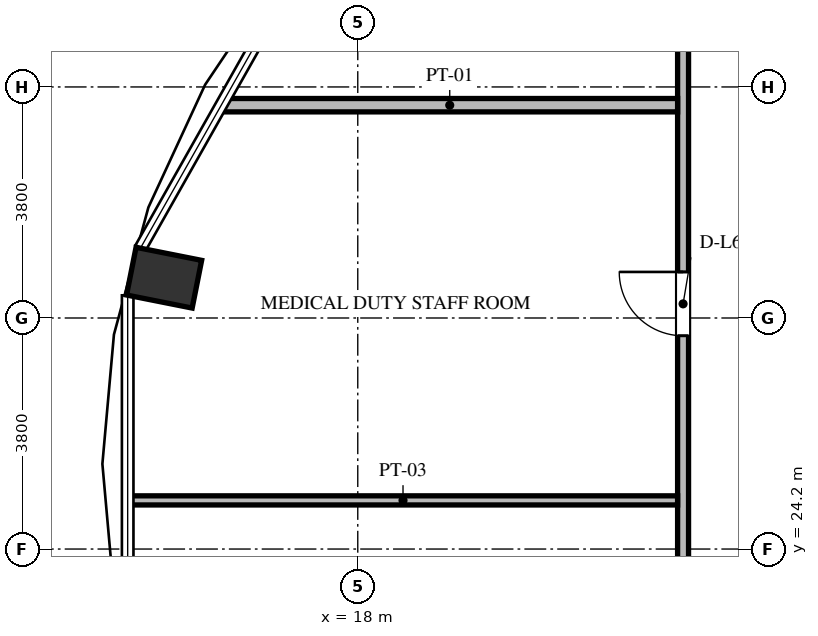
"""IFC4 building model, lengths in metres.
Left out: names, types, materials, properties, quantities, classifications, styles, units other than length and angle.
Written with IfcOpenShell. Run it as: python <this file> out.ifc"""

import sys

from ifc_helpers import new_model, si_unit, direction, frame, frame_2d, origin, origin_2d, place, context, subcontext, project, spatial, rectangle, extrude, element, fill, save


model = new_model("IFC4")
c1 = context("Model", 3, precision=1e-05, world=origin(), true_north=direction((0.0, 1.0)))
c2 = subcontext(c1, "Body", "Model", "MODEL_VIEW")
j1 = project(units=[si_unit("LENGTHUNIT", "METRE"), si_unit("PLANEANGLEUNIT", "RADIAN")], contexts=[c1])
p1 = place(None, origin())
s1 = spatial("IfcSite", under=j1, at=p1, CompositionType="ELEMENT")
p2 = place(p1, origin())
s2 = spatial("IfcBuilding", under=s1, at=p2, CompositionType="ELEMENT")
p3 = place(p2, frame((0.0, 0.0, 265.968)))
s3 = spatial("IfcBuildingStorey", under=s2, at=p3, CompositionType="ELEMENT", Elevation=265.968)
p4 = place(p3, frame((14.815, 28.663, 0.0), z_axis=(0.0, 0.0, 1.0), x_axis=(-0.980785280403, 0.195090322016, 0.0)))
e1 = element("IfcColumn", 1, at=p4, inside=s3, PredefinedType="COLUMN", context=c2, shape_type="SweptSolid", body=[
    extrude(rectangle(XDim=1.1, YDim=0.8, at=origin_2d()), origin(), (0.0, 0.0, 1.0), 3.648),
])
p5 = place(p3, frame((23.35, 19.98, 0.0), z_axis=(0.0, 0.0, 1.0), x_axis=(0.0, 1.0, 0.0)))
e2 = element("IfcWall", 2, at=p5, inside=s3, PredefinedType="PARTITIONING", context=c2, shape_type="SweptSolid", body=[
    extrude(rectangle(XDim=16.042, YDim=0.18, at=frame_2d((8.021, 0.0))), origin(), (0.0, 0.0, 1.0), 3.198),
])
p6 = place(p5, frame((2.144, 0.0, 0.0)))
e3 = element("IfcOpeningElement", 3, at=p6, cuts=e2, PredefinedType="OPENING", context=c2, shape_type="SweptSolid", body=[
    extrude(rectangle(XDim=1.05, YDim=2.15, at=frame_2d((0.525, 1.075))), frame((0.0, 0.1, 0.0), z_axis=(0.0, -1.0, 0.0), x_axis=(1.0, 0.0, 0.0)), (0.0, 0.0, 1.0), 0.2),
])
p7 = place(p5, frame((12.515, 0.0, 0.0)))
e4 = element("IfcOpeningElement", 4, at=p7, cuts=e2, PredefinedType="OPENING", context=c2, shape_type="SweptSolid", body=[
    extrude(rectangle(XDim=1.05, YDim=2.15, at=frame_2d((0.525, 1.075))), frame((0.0, 0.1, 0.0), z_axis=(0.0, -1.0, 0.0), x_axis=(1.0, 0.0, 0.0)), (0.0, 0.0, 1.0), 0.2),
])
p8 = place(p5, frame((7.728, 0.0, 0.0)))
e5 = element("IfcOpeningElement", 5, at=p8, cuts=e2, PredefinedType="OPENING", context=c2, shape_type="SweptSolid", body=[
    extrude(rectangle(XDim=1.05, YDim=2.15, at=frame_2d((0.525, 1.075))), frame((0.0, 0.1, 0.0), z_axis=(0.0, -1.0, 0.0), x_axis=(1.0, 0.0, 0.0)), (0.0, 0.0, 1.0), 0.2),
])
p9 = place(p3, frame((14.228, 25.0, 0.0), z_axis=(0.0, 0.0, 1.0), x_axis=(1.0, 0.0, 0.0)))
e6 = element("IfcWall", 6, at=p9, inside=s3, PredefinedType="PARTITIONING", context=c2, shape_type="SweptSolid", body=[
    extrude(rectangle(XDim=9.032, YDim=0.15, at=frame_2d((4.516, 0.0))), origin(), (0.0, 0.0, 1.0), 3.198),
])
p10 = place(p3, frame((15.765, 31.5, 0.0), z_axis=(0.0, 0.0, 1.0), x_axis=(1.0, 0.0, 0.0)))
e7 = element("IfcWall", 7, at=p10, inside=s3, PredefinedType="PARTITIONING", context=c2, shape_type="SweptSolid", body=[
    extrude(rectangle(XDim=7.495, YDim=0.22, at=frame_2d((3.748, 0.0))), origin(), (0.0, 0.0, 1.0), 3.198),
])
p11 = place(p8, origin())
e8 = element("IfcDoor", 8, at=p11, inside=s3, OperationType="SINGLE_SWING_RIGHT", PredefinedType="DOOR", context=c2, shape_type="SweptSolid", body=[
    extrude(rectangle(XDim=1.05, YDim=2.15, at=frame_2d((0.525, 1.075))), frame((0.0, 0.025, 0.0), z_axis=(0.0, -1.0, 0.0), x_axis=(1.0, 0.0, 0.0)), (0.0, 0.0, 1.0), 0.05),
])
fill(e5, e8)
save(model, sys.argv[1])
